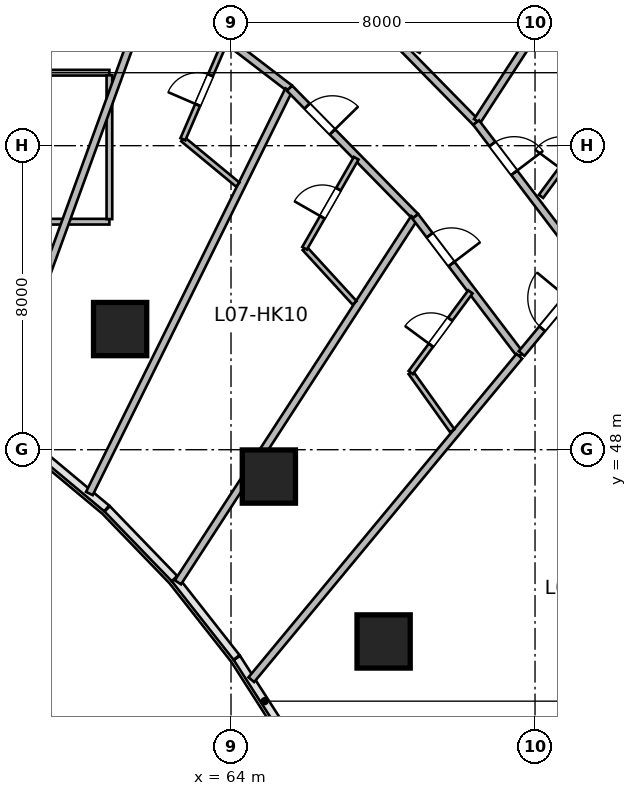
"""IFC4 building model, lengths in metres.
Left out: names, types, materials, properties, quantities, classifications, styles, units other than length and angle.
Written with IfcOpenShell. Run it as: python <this file> out.ifc"""

import sys

from ifc_helpers import new_model, si_unit, direction, frame, frame_2d, origin, origin_2d, place, context, subcontext, project, spatial, rectangle, circle, extrude, source, transform, mapped, element, fill, save


model = new_model("IFC4")
c1 = context("Model", 3, precision=1e-05, world=origin(), true_north=direction((0.0, 1.0)))
c2 = subcontext(c1, "Body", "Model", "MODEL_VIEW")
j1 = project(units=[si_unit("LENGTHUNIT", "METRE"), si_unit("PLANEANGLEUNIT", "RADIAN")], contexts=[c1])
p1 = place(None, origin())
s1 = spatial("IfcSite", under=j1, at=p1, CompositionType="ELEMENT")
p2 = place(p1, origin())
s2 = spatial("IfcBuilding", under=s1, at=p2, CompositionType="ELEMENT")
p3 = place(p2, frame((0.0, 0.0, 39.0)))
s3 = spatial("IfcBuildingStorey", under=s2, at=p3, CompositionType="ELEMENT", Elevation=39.0)
m1 = source(origin(), c2, "Body", "SweptSolid", [
    extrude(circle(Radius=0.7, at=origin_2d()), origin(), (0.0, 0.0, 1.0), 3.6),
])
for number, where, z_axis, x_axis in (
    (1, (61.082, 51.175, 0.0), (0.0, 0.0, 1.0), (0.409, 0.912, 0.0)),
    (2, (64.996, 47.294, 0.0), (0.0, 0.0, 1.0), (0.558, 0.83, 0.0)),
    (3, (68.015, 42.955, 0.0), (0.0, 0.0, 1.0), (0.691, 0.723, 0.0)),
):
    element("IfcColumn", number, at=place(p3, frame(where, z_axis=z_axis, x_axis=x_axis)), inside=s3, PredefinedType="COLUMN", context=c2, shape_type="MappedRepresentation", body=[
        mapped(m1, transform((0.0, 0.0, 0.0), scale=1.0)),
    ])
m2 = source(origin(), c2, "Body", "SweptSolid", [
    extrude(rectangle(XDim=6.6, YDim=0.15, at=frame_2d((3.3, 0.0))), origin(), (0.0, 0.0, 1.0), 2.803),
])
p4 = place(p3, frame((54.2, 54.0, 0.0), z_axis=(0.0, 0.0, 1.0), x_axis=(1.0, 0.0, 0.0)))
e4 = element("IfcWall", 4, at=p4, inside=s3, PredefinedType="PARTITIONING", context=c2, shape_type="MappedRepresentation", body=[
    mapped(m2, transform((0.0, 0.0, 0.0), scale=1.0)),
])
m3 = source(origin(), c2, "Body", "SweptSolid", [
    extrude(rectangle(XDim=6.6, YDim=0.15, at=frame_2d((3.3, 0.0))), origin(), (0.0, 0.0, 1.0), 3.36),
])
p5 = place(p3, frame((54.2, 57.92, 0.0), z_axis=(0.0, 0.0, 1.0), x_axis=(1.0, 0.0, 0.0)))
e5 = element("IfcWall", 5, at=p5, inside=s3, PredefinedType="PARTITIONING", context=c2, shape_type="MappedRepresentation", body=[
    mapped(m3, transform((0.0, 0.0, 0.0), scale=1.0)),
])
p6 = place(p5, frame((2.825, 0.0, 0.0)))
e6 = element("IfcOpeningElement", 6, at=p6, cuts=e5, PredefinedType="OPENING", context=c2, shape_type="SweptSolid", body=[
    extrude(rectangle(XDim=0.95, YDim=2.1, at=frame_2d((0.475, 1.05))), frame((0.0, 0.085, 0.0), z_axis=(0.0, -1.0, 0.0), x_axis=(1.0, 0.0, 0.0)), (0.0, 0.0, 1.0), 0.17),
])
m4 = source(origin(), c2, "Body", "SweptSolid", [
    extrude(rectangle(XDim=3.785, YDim=0.15, at=frame_2d((1.893, 0.0))), origin(), (0.0, 0.0, 1.0), 3.36),
])
p7 = place(p3, frame((60.8, 54.067, 0.0), z_axis=(0.0, 0.0, 1.0), x_axis=(0.0, 1.0, 0.0)))
e7 = element("IfcWall", 7, at=p7, inside=s3, PredefinedType="PARTITIONING", context=c2, shape_type="MappedRepresentation", body=[
    mapped(m4, transform((0.0, 0.0, 0.0), scale=1.0)),
])
m5 = source(origin(), c2, "Body", "SweptSolid", [
    extrude(rectangle(XDim=4.546, YDim=0.195, at=frame_2d((2.273, 0.0))), origin(), (0.0, 0.0, 1.0), 3.36),
])
p8 = place(p3, frame((61.931, 60.275, 0.0), z_axis=(0.0, 0.0, 1.0), x_axis=(0.793907931297, -0.608037989457, 0.0)))
e8 = element("IfcWall", 8, at=p8, inside=s3, PredefinedType="PARTITIONING", context=c2, shape_type="MappedRepresentation", body=[
    mapped(m5, transform((0.0, 0.0, 0.0), scale=1.0)),
])
p9 = place(p8, frame((0.616, 0.0, 0.0)))
e9 = element("IfcOpeningElement", 9, at=p9, cuts=e8, PredefinedType="OPENING", context=c2, shape_type="SweptSolid", body=[
    extrude(rectangle(XDim=0.95, YDim=2.15, at=frame_2d((0.475, 1.075))), frame((0.0, 0.107, 0.0), z_axis=(0.0, -1.0, 0.0), x_axis=(1.0, 0.0, 0.0)), (0.0, 0.0, 1.0), 0.215),
])
m6 = source(origin(), c2, "Body", "SweptSolid", [
    extrude(rectangle(XDim=12.196, YDim=0.195, at=frame_2d((6.098, 0.0))), origin(), (0.0, 0.0, 1.0), 3.36),
])
p10 = place(p3, frame((57.742, 48.766, 0.0), z_axis=(0.0, 0.0, 1.0), x_axis=(0.342022711534, 0.939691686031, 0.0)))
e10 = element("IfcWall", 10, at=p10, inside=s3, PredefinedType="PARTITIONING", context=c2, shape_type="MappedRepresentation", body=[
    mapped(m6, transform((0.0, 0.0, 0.0), scale=1.0)),
])
m7 = source(origin(), c2, "Body", "SweptSolid", [
    extrude(rectangle(XDim=11.844, YDim=0.195, at=frame_2d((5.922, 0.0))), origin(), (0.0, 0.0, 1.0), 3.36),
])
p11 = place(p3, frame((60.273, 46.848, 0.0), z_axis=(0.0, 0.0, 1.0), x_axis=(0.442871152218, 0.896585267854, 0.0)))
e11 = element("IfcWall", 11, at=p11, inside=s3, PredefinedType="PARTITIONING", context=c2, shape_type="MappedRepresentation", body=[
    mapped(m7, transform((0.0, 0.0, 0.0), scale=1.0)),
])
m8 = source(origin(), c2, "Body", "SweptSolid", [
    extrude(rectangle(XDim=1.873, YDim=0.14, at=frame_2d((0.937, 0.0))), origin(), (0.0, 0.0, 1.0), 3.36),
])
p12 = place(p3, frame((62.734, 56.169, 0.0), z_axis=(0.0, 0.0, 1.0), x_axis=(0.77069451688, -0.637204803537, 0.0)))
e12 = element("IfcWall", 12, at=p12, inside=s3, PredefinedType="PARTITIONING", context=c2, shape_type="MappedRepresentation", body=[
    mapped(m8, transform((0.0, 0.0, 0.0), scale=1.0)),
])
m9 = source(origin(), c2, "Body", "SweptSolid", [
    extrude(rectangle(XDim=2.817, YDim=0.14, at=frame_2d((1.409, 0.0))), origin(), (0.0, 0.0, 1.0), 3.36),
])
p13 = place(p3, frame((62.734, 56.169, 0.0), z_axis=(0.0, 0.0, 1.0), x_axis=(0.395999429727, 0.918250756415, 0.0)))
e13 = element("IfcWall", 13, at=p13, inside=s3, PredefinedType="PARTITIONING", context=c2, shape_type="MappedRepresentation", body=[
    mapped(m9, transform((0.0, 0.0, 0.0), scale=1.0)),
])
p14 = place(p13, frame((0.984, 0.0, 0.0)))
e14 = element("IfcOpeningElement", 14, at=p14, cuts=e13, PredefinedType="OPENING", context=c2, shape_type="SweptSolid", body=[
    extrude(rectangle(XDim=0.85, YDim=2.05, at=frame_2d((0.425, 1.025))), frame((0.0, 0.08, 0.0), z_axis=(0.0, -1.0, 0.0), x_axis=(1.0, 0.0, 0.0)), (0.0, 0.0, 1.0), 0.16),
])
m10 = source(origin(), c2, "Body", "SweptSolid", [
    extrude(rectangle(XDim=5.087, YDim=0.195, at=frame_2d((2.543, 0.0))), origin(), (0.0, 0.0, 1.0), 3.36),
])
p15 = place(p3, frame((66.887, 60.238, 0.0), z_axis=(0.0, 0.0, 1.0), x_axis=(0.700428330775, -0.7137227427, 0.0)))
e15 = element("IfcWall", 15, at=p15, inside=s3, PredefinedType="PARTITIONING", context=c2, shape_type="MappedRepresentation", body=[
    mapped(m10, transform((0.0, 0.0, 0.0), scale=1.0)),
])
p16 = place(p15, frame((0.746, 0.0, 0.0)))
e16 = element("IfcOpeningElement", 16, at=p16, cuts=e15, PredefinedType="OPENING", context=c2, shape_type="SweptSolid", body=[
    extrude(rectangle(XDim=0.95, YDim=2.15, at=frame_2d((0.475, 1.075))), frame((0.0, 0.107, 0.0), z_axis=(0.0, -1.0, 0.0), x_axis=(1.0, 0.0, 0.0)), (0.0, 0.0, 1.0), 0.215),
])
m11 = source(origin(), c2, "Body", "SweptSolid", [
    extrude(rectangle(XDim=11.403, YDim=0.195, at=frame_2d((5.701, 0.0))), origin(), (0.0, 0.0, 1.0), 3.36),
])
p17 = place(p3, frame((70.477, 56.647, 0.0), z_axis=(0.0, 0.0, 1.0), x_axis=(0.544246090008, 0.838925618581, 0.0)))
e17 = element("IfcWall", 17, at=p17, inside=s3, PredefinedType="PARTITIONING", context=c2, shape_type="MappedRepresentation", body=[
    mapped(m11, transform((0.0, 0.0, 0.0), scale=1.0)),
])
m12 = source(origin(), c2, "Body", "SweptSolid", [
    extrude(rectangle(XDim=2.732, YDim=0.14, at=frame_2d((1.366, 0.0))), origin(), (0.0, 0.0, 1.0), 3.36),
])
p18 = place(p3, frame((68.902, 58.476, 0.0), z_axis=(0.0, 0.0, 1.0), x_axis=(0.497254966372, 0.867604459658, 0.0)))
e18 = element("IfcWall", 18, at=p18, inside=s3, PredefinedType="PARTITIONING", context=c2, shape_type="MappedRepresentation", body=[
    mapped(m12, transform((0.0, 0.0, 0.0), scale=1.0)),
])
p19 = place(p18, frame((0.941, 0.0, 0.0)))
e19 = element("IfcOpeningElement", 19, at=p19, cuts=e18, PredefinedType="OPENING", context=c2, shape_type="SweptSolid", body=[
    extrude(rectangle(XDim=0.85, YDim=2.05, at=frame_2d((0.425, 1.025))), frame((0.0, 0.08, 0.0), z_axis=(0.0, -1.0, 0.0), x_axis=(1.0, 0.0, 0.0)), (0.0, 0.0, 1.0), 0.16),
])
m13 = source(origin(), c2, "Body", "SweptSolid", [
    extrude(rectangle(XDim=4.724, YDim=0.195, at=frame_2d((2.362, 0.0))), origin(), (0.0, 0.0, 1.0), 3.36),
])
p20 = place(p3, frame((65.541, 57.511, 0.0), z_axis=(0.0, 0.0, 1.0), x_axis=(0.700435057457, -0.713716141253, 0.0)))
e20 = element("IfcWall", 20, at=p20, inside=s3, PredefinedType="PARTITIONING", context=c2, shape_type="MappedRepresentation", body=[
    mapped(m13, transform((0.0, 0.0, 0.0), scale=1.0)),
])
p21 = place(p20, frame((0.659, 0.0, 0.0)))
e21 = element("IfcOpeningElement", 21, at=p21, cuts=e20, PredefinedType="OPENING", context=c2, shape_type="SweptSolid", body=[
    extrude(rectangle(XDim=0.95, YDim=2.15, at=frame_2d((0.475, 1.075))), frame((0.0, 0.107, 0.0), z_axis=(0.0, -1.0, 0.0), x_axis=(1.0, 0.0, 0.0)), (0.0, 0.0, 1.0), 0.215),
])
m14 = source(origin(), c2, "Body", "SweptSolid", [
    extrude(rectangle(XDim=11.429, YDim=0.195, at=frame_2d((5.714, 0.0))), origin(), (0.0, 0.0, 1.0), 3.36),
])
p22 = place(p3, frame((62.604, 44.511, 0.0), z_axis=(0.0, 0.0, 1.0), x_axis=(0.544215487077, 0.838945471187, 0.0)))
e22 = element("IfcWall", 22, at=p22, inside=s3, PredefinedType="PARTITIONING", context=c2, shape_type="MappedRepresentation", body=[
    mapped(m14, transform((0.0, 0.0, 0.0), scale=1.0)),
])
m15 = source(origin(), c2, "Body", "SweptSolid", [
    extrude(rectangle(XDim=1.947, YDim=0.14, at=frame_2d((0.973, 0.0))), origin(), (0.0, 0.0, 1.0), 2.803),
])
p23 = place(p3, frame((65.936, 53.3, 0.0), z_axis=(0.0, 0.0, 1.0), x_axis=(0.675383794012, -0.737466426888, 0.0)))
e23 = element("IfcWall", 23, at=p23, inside=s3, PredefinedType="PARTITIONING", context=c2, shape_type="MappedRepresentation", body=[
    mapped(m15, transform((0.0, 0.0, 0.0), scale=1.0)),
])
m16 = source(origin(), c2, "Body", "SweptSolid", [
    extrude(rectangle(XDim=2.731, YDim=0.14, at=frame_2d((1.366, 0.0))), origin(), (0.0, 0.0, 1.0), 3.36),
])
p24 = place(p3, frame((65.936, 53.3, 0.0), z_axis=(0.0, 0.0, 1.0), x_axis=(0.497120404056, 0.867681568244, 0.0)))
e24 = element("IfcWall", 24, at=p24, inside=s3, PredefinedType="PARTITIONING", context=c2, shape_type="MappedRepresentation", body=[
    mapped(m16, transform((0.0, 0.0, 0.0), scale=1.0)),
])
p25 = place(p24, frame((0.941, 0.0, 0.0)))
e25 = element("IfcOpeningElement", 25, at=p25, cuts=e24, PredefinedType="OPENING", context=c2, shape_type="SweptSolid", body=[
    extrude(rectangle(XDim=0.85, YDim=2.05, at=frame_2d((0.425, 1.025))), frame((0.0, 0.08, 0.0), z_axis=(0.0, -1.0, 0.0), x_axis=(1.0, 0.0, 0.0)), (0.0, 0.0, 1.0), 0.16),
])
m17 = source(origin(), c2, "Body", "SweptSolid", [
    extrude(rectangle(XDim=4.928, YDim=0.195, at=frame_2d((2.464, 0.0))), origin(), (0.0, 0.0, 1.0), 3.36),
])
p26 = place(p3, frame((70.45, 56.607, 0.0), z_axis=(0.0, 0.0, 1.0), x_axis=(0.604793043708, -0.796382680803, 0.0)))
e26 = element("IfcWall", 26, at=p26, inside=s3, PredefinedType="PARTITIONING", context=c2, shape_type="MappedRepresentation", body=[
    mapped(m17, transform((0.0, 0.0, 0.0), scale=1.0)),
])
p27 = place(p26, frame((0.708, 0.0, 0.0)))
e27 = element("IfcOpeningElement", 27, at=p27, cuts=e26, PredefinedType="OPENING", context=c2, shape_type="SweptSolid", body=[
    extrude(rectangle(XDim=0.95, YDim=2.15, at=frame_2d((0.475, 1.075))), frame((0.0, 0.107, 0.0), z_axis=(0.0, -1.0, 0.0), x_axis=(1.0, 0.0, 0.0)), (0.0, 0.0, 1.0), 0.215),
])
m18 = source(origin(), c2, "Body", "SweptSolid", [
    extrude(rectangle(XDim=2.64, YDim=0.14, at=frame_2d((1.32, 0.0))), origin(), (0.0, 0.0, 1.0), 3.36),
])
p28 = place(p3, frame((72.157, 54.666, 0.0), z_axis=(0.0, 0.0, 1.0), x_axis=(0.594630255283, 0.803999290735, 0.0)))
e28 = element("IfcWall", 28, at=p28, inside=s3, PredefinedType="PARTITIONING", context=c2, shape_type="MappedRepresentation", body=[
    mapped(m18, transform((0.0, 0.0, 0.0), scale=1.0)),
])
p29 = place(p28, frame((0.895, 0.0, 0.0)))
e29 = element("IfcOpeningElement", 29, at=p29, cuts=e28, PredefinedType="OPENING", context=c2, shape_type="SweptSolid", body=[
    extrude(rectangle(XDim=0.85, YDim=2.05, at=frame_2d((0.425, 1.025))), frame((0.0, 0.08, 0.0), z_axis=(0.0, -1.0, 0.0), x_axis=(1.0, 0.0, 0.0)), (0.0, 0.0, 1.0), 0.16),
])
m19 = source(origin(), c2, "Body", "SweptSolid", [
    extrude(rectangle(XDim=4.576, YDim=0.195, at=frame_2d((2.288, 0.0))), origin(), (0.0, 0.0, 1.0), 3.36),
])
p30 = place(p3, frame((68.85, 54.139, 0.0), z_axis=(0.0, 0.0, 1.0), x_axis=(0.604795096156, -0.796381122118, 0.0)))
e30 = element("IfcWall", 30, at=p30, inside=s3, PredefinedType="PARTITIONING", context=c2, shape_type="MappedRepresentation", body=[
    mapped(m19, transform((0.0, 0.0, 0.0), scale=1.0)),
])
p31 = place(p30, frame((0.623, 0.0, 0.0)))
e31 = element("IfcOpeningElement", 31, at=p31, cuts=e30, PredefinedType="OPENING", context=c2, shape_type="SweptSolid", body=[
    extrude(rectangle(XDim=0.95, YDim=2.15, at=frame_2d((0.475, 1.075))), frame((0.0, 0.107, 0.0), z_axis=(0.0, -1.0, 0.0), x_axis=(1.0, 0.0, 0.0)), (0.0, 0.0, 1.0), 0.215),
])
m20 = source(origin(), c2, "Body", "SweptSolid", [
    extrude(rectangle(XDim=11.053, YDim=0.195, at=frame_2d((5.527, 0.0))), origin(), (0.0, 0.0, 1.0), 3.36),
])
p32 = place(p3, frame((64.534, 41.949, 0.0), z_axis=(0.0, 0.0, 1.0), x_axis=(0.638131235571, 0.769927611005, 0.0)))
e32 = element("IfcWall", 32, at=p32, inside=s3, PredefinedType="PARTITIONING", context=c2, shape_type="MappedRepresentation", body=[
    mapped(m20, transform((0.0, 0.0, 0.0), scale=1.0)),
])
m21 = source(origin(), c2, "Body", "SweptSolid", [
    extrude(rectangle(XDim=1.884, YDim=0.14, at=frame_2d((0.942, 0.0))), origin(), (0.0, 0.0, 1.0), 2.803),
])
p33 = place(p3, frame((68.729, 50.031, 0.0), z_axis=(0.0, 0.0, 1.0), x_axis=(0.580833492897, -0.814022391295, 0.0)))
e33 = element("IfcWall", 33, at=p33, inside=s3, PredefinedType="PARTITIONING", context=c2, shape_type="MappedRepresentation", body=[
    mapped(m21, transform((0.0, 0.0, 0.0), scale=1.0)),
])
p34 = place(p3, frame((68.729, 50.031, 0.0), z_axis=(0.0, 0.0, 1.0), x_axis=(0.594674469522, 0.803966588422, 0.0)))
e34 = element("IfcWall", 34, at=p34, inside=s3, PredefinedType="PARTITIONING", context=c2, shape_type="MappedRepresentation", body=[
    mapped(m18, transform((0.0, 0.0, 0.0), scale=1.0)),
])
p35 = place(p34, frame((0.895, 0.0, 0.0)))
e35 = element("IfcOpeningElement", 35, at=p35, cuts=e34, PredefinedType="OPENING", context=c2, shape_type="SweptSolid", body=[
    extrude(rectangle(XDim=0.85, YDim=2.05, at=frame_2d((0.425, 1.025))), frame((0.0, 0.08, 0.0), z_axis=(0.0, -1.0, 0.0), x_axis=(1.0, 0.0, 0.0)), (0.0, 0.0, 1.0), 0.16),
])
m22 = source(origin(), c2, "Body", "SweptSolid", [
    extrude(rectangle(XDim=2.748, YDim=0.195, at=frame_2d((1.374, 0.0))), origin(), (0.0, 0.0, 1.0), 3.36),
])
p36 = place(p3, frame((71.647, 50.531, 0.0), z_axis=(0.0, 0.0, 1.0), x_axis=(0.638111168284, 0.769944242729, 0.0)))
e36 = element("IfcWall", 36, at=p36, inside=s3, PredefinedType="PARTITIONING", context=c2, shape_type="MappedRepresentation", body=[
    mapped(m22, transform((0.0, 0.0, 0.0), scale=1.0)),
])
p37 = place(p36, frame((0.849, 0.0, 0.0)))
e37 = element("IfcOpeningElement", 37, at=p37, cuts=e36, PredefinedType="OPENING", context=c2, shape_type="SweptSolid", body=[
    extrude(rectangle(XDim=1.05, YDim=2.15, at=frame_2d((0.525, 1.075))), frame((0.0, 0.107, 0.0), z_axis=(0.0, -1.0, 0.0), x_axis=(1.0, 0.0, 0.0)), (0.0, 0.0, 1.0), 0.215),
])
m23 = source(origin(), c2, "Body", "SweptSolid", [
    extrude(rectangle(XDim=0.85, YDim=2.05, at=frame_2d((0.425, 1.025))), frame((0.0, 0.025, 0.0), z_axis=(0.0, -1.0, 0.0), x_axis=(1.0, 0.0, 0.0)), (0.0, 0.0, 1.0), 0.05),
])
p38 = place(p14, origin())
e38 = element("IfcDoor", 38, at=p38, inside=s3, OperationType="SINGLE_SWING_LEFT", PredefinedType="DOOR", context=c2, shape_type="MappedRepresentation", body=[
    mapped(m23, transform((0.0, 0.0, 0.0), scale=1.0)),
])
fill(e14, e38)
m24 = source(origin(), c2, "Body", "SweptSolid", [
    extrude(rectangle(XDim=0.95, YDim=2.15, at=frame_2d((0.475, 1.075))), frame((0.0, 0.025, 0.0), z_axis=(0.0, -1.0, 0.0), x_axis=(1.0, 0.0, 0.0)), (0.0, 0.0, 1.0), 0.05),
])
p39 = place(p21, origin())
e39 = element("IfcDoor", 39, at=p39, inside=s3, OperationType="SINGLE_SWING_RIGHT", PredefinedType="DOOR", context=c2, shape_type="MappedRepresentation", body=[
    mapped(m24, transform((0.0, 0.0, 0.0), scale=1.0)),
])
fill(e21, e39)
p40 = place(p25, origin())
e40 = element("IfcDoor", 40, at=p40, inside=s3, OperationType="SINGLE_SWING_LEFT", PredefinedType="DOOR", context=c2, shape_type="MappedRepresentation", body=[
    mapped(m23, transform((0.0, 0.0, 0.0), scale=1.0)),
])
fill(e25, e40)
p41 = place(p27, origin())
e41 = element("IfcDoor", 41, at=p41, inside=s3, OperationType="SINGLE_SWING_RIGHT", PredefinedType="DOOR", context=c2, shape_type="MappedRepresentation", body=[
    mapped(m24, transform((0.0, 0.0, 0.0), scale=1.0)),
])
fill(e27, e41)
p42 = place(p31, origin())
e42 = element("IfcDoor", 42, at=p42, inside=s3, OperationType="SINGLE_SWING_RIGHT", PredefinedType="DOOR", context=c2, shape_type="MappedRepresentation", body=[
    mapped(m24, transform((0.0, 0.0, 0.0), scale=1.0)),
])
fill(e31, e42)
p43 = place(p35, origin())
e43 = element("IfcDoor", 43, at=p43, inside=s3, OperationType="SINGLE_SWING_LEFT", PredefinedType="DOOR", context=c2, shape_type="MappedRepresentation", body=[
    mapped(m23, transform((0.0, 0.0, 0.0), scale=1.0)),
])
fill(e35, e43)
m25 = source(origin(), c2, "Body", "SweptSolid", [
    extrude(rectangle(XDim=1.05, YDim=2.15, at=frame_2d((0.525, 1.075))), frame((0.0, 0.025, 0.0), z_axis=(0.0, -1.0, 0.0), x_axis=(1.0, 0.0, 0.0)), (0.0, 0.0, 1.0), 0.05),
])
p44 = place(p37, origin())
e44 = element("IfcDoor", 44, at=p44, inside=s3, OperationType="SINGLE_SWING_RIGHT", PredefinedType="DOOR", context=c2, shape_type="MappedRepresentation", body=[
    mapped(m25, transform((0.0, 0.0, 0.0), scale=1.0)),
])
fill(e37, e44)
save(model, sys.argv[1])
